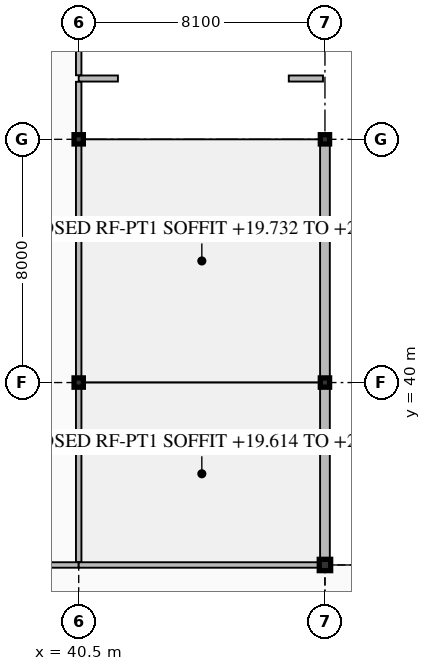
"""IFC4 building model, lengths in metres.
Left out: names, types, materials, properties, quantities, classifications, styles, units other than length and angle.
Written with IfcOpenShell. Run it as: python <this file> out.ifc"""

import sys

from ifc_helpers import new_model, si_unit, direction, frame, frame_2d, origin, origin_2d, place, context, subcontext, project, spatial, rectangle, hollow_rectangle, i_section, extrude, element, fill, save


model = new_model("IFC4")
c1 = context("Model", 3, precision=1e-05, world=origin(), true_north=direction((0.0, 1.0)))
c2 = subcontext(c1, "Body", "Model", "MODEL_VIEW")
j1 = project(units=[si_unit("LENGTHUNIT", "METRE"), si_unit("PLANEANGLEUNIT", "RADIAN")], contexts=[c1])
p1 = place(None, origin())
s1 = spatial("IfcSite", under=j1, at=p1, CompositionType="ELEMENT")
p2 = place(p1, origin())
s2 = spatial("IfcBuilding", under=s1, at=p2, CompositionType="ELEMENT")
p3 = place(p2, frame((0.0, 0.0, 14.7)))
s3 = spatial("IfcBuildingStorey", under=s2, at=p3, CompositionType="ELEMENT", Elevation=14.7)
for number, where, z_axis, x_axis in (
    (1, (40.5, 40.0, 0.0), (0.0, 0.0, 1.0), (1.0, 0.0, 0.0)),
    (2, (40.5, 48.0, 0.0), (0.0, 0.0, 1.0), (1.0, 0.0, 0.0)),
):
    element("IfcColumn", number, at=place(p3, frame(where, z_axis=z_axis, x_axis=x_axis)), inside=s3, PredefinedType="COLUMN", context=c2, shape_type="SweptSolid", body=[
        extrude(hollow_rectangle(XDim=0.305, YDim=0.305, WallThickness=0.016, InnerFilletRadius=0.016, OuterFilletRadius=0.032, at=origin_2d()), origin(), (0.0, 0.0, 1.0), 5.1),
    ])
p4 = place(p3, frame((48.6, 34.0, 0.0), z_axis=(0.0, 0.0, 1.0), x_axis=(1.0, 0.0, 0.0)))
e3 = element("IfcColumn", 3, at=p4, inside=s3, PredefinedType="COLUMN", context=c2, shape_type="SweptSolid", body=[
    extrude(i_section(OverallWidth=0.374, OverallDepth=0.372, WebThickness=0.016, FlangeThickness=0.026, FilletRadius=0.016, at=origin_2d()), origin(), (0.0, 0.0, 1.0), 5.1),
])
for number, where, z_axis, x_axis in (
    (4, (48.6, 40.0, 0.0), (0.0, 0.0, 1.0), (1.0, 0.0, 0.0)),
    (5, (48.6, 48.0, 0.0), (0.0, 0.0, 1.0), (1.0, 0.0, 0.0)),
):
    element("IfcColumn", number, at=place(p3, frame(where, z_axis=z_axis, x_axis=x_axis)), inside=s3, PredefinedType="COLUMN", context=c2, shape_type="SweptSolid", body=[
        extrude(hollow_rectangle(XDim=0.305, YDim=0.305, WallThickness=0.016, InnerFilletRadius=0.016, OuterFilletRadius=0.032, at=origin_2d()), origin(), (0.0, 0.0, 1.0), 4.84),
    ])
p5 = place(p3, frame((48.6, 34.18, 0.0), z_axis=(0.0, 0.0, 1.0), x_axis=(0.0, 1.0, 0.0)))
e6 = element("IfcWall", 6, at=p5, inside=s3, PredefinedType="SOLIDWALL", context=c2, shape_type="SweptSolid", body=[
    extrude(rectangle(XDim=13.64, YDim=0.32, at=frame_2d((6.82, 0.0))), origin(), (0.0, 0.0, 1.0), 4.84),
])
p6 = place(p5, frame((8.55, 0.0, 0.85)))
e7 = element("IfcOpeningElement", 7, at=p6, cuts=e6, PredefinedType="OPENING", context=c2, shape_type="SweptSolid", body=[
    extrude(rectangle(XDim=0.9, YDim=2.4, at=frame_2d((0.45, 1.2))), frame((0.0, 0.17, 0.0), z_axis=(0.0, -1.0, 0.0), x_axis=(1.0, 0.0, 0.0)), (0.0, 0.0, 1.0), 0.34),
])
p7 = place(p3, frame((36.2, 34.0, 0.0), z_axis=(0.0, 0.0, 1.0), x_axis=(1.0, 0.0, 0.0)))
e8 = element("IfcWall", 8, at=p7, inside=s3, PredefinedType="PARTITIONING", context=c2, shape_type="SweptSolid", body=[
    extrude(rectangle(XDim=4.3, YDim=0.18, at=frame_2d((2.15, 0.0))), origin(), (0.0, 0.0, 1.0), 4.144),
])
p8 = place(p7, frame((1.55, 0.0, 0.0)))
e9 = element("IfcOpeningElement", 9, at=p8, cuts=e8, PredefinedType="OPENING", context=c2, shape_type="SweptSolid", body=[
    extrude(rectangle(XDim=1.2, YDim=2.2, at=frame_2d((0.6, 1.1))), frame((0.0, 0.1, 0.0), z_axis=(0.0, -1.0, 0.0), x_axis=(1.0, 0.0, 0.0)), (0.0, 0.0, 1.0), 0.2),
])
p9 = place(p3, frame((40.5, 34.0, 0.0), z_axis=(0.0, 0.0, 1.0), x_axis=(1.0, 0.0, 0.0)))
e10 = element("IfcWall", 10, at=p9, inside=s3, PredefinedType="PARTITIONING", context=c2, shape_type="SweptSolid", body=[
    extrude(rectangle(XDim=7.905, YDim=0.18, at=frame_2d((3.953, 0.0))), origin(), (0.0, 0.0, 1.0), 4.144),
])
p10 = place(p3, frame((40.5, 50.0, 0.0), z_axis=(0.0, 0.0, 1.0), x_axis=(1.0, 0.0, 0.0)))
e11 = element("IfcWall", 11, at=p10, inside=s3, PredefinedType="PARTITIONING", context=c2, shape_type="SweptSolid", body=[
    extrude(rectangle(XDim=1.29, YDim=0.2, at=frame_2d((0.645, 0.0))), origin(), (0.0, 0.0, 1.0), 4.84),
])
p11 = place(p3, frame((47.41, 50.0, 0.0), z_axis=(0.0, 0.0, 1.0), x_axis=(1.0, 0.0, 0.0)))
e12 = element("IfcWall", 12, at=p11, inside=s3, PredefinedType="PARTITIONING", context=c2, shape_type="SweptSolid", body=[
    extrude(rectangle(XDim=1.125, YDim=0.2, at=frame_2d((0.562, 0.0))), origin(), (0.0, 0.0, 1.0), 4.84),
])
p12 = place(p3, frame((40.5, 34.098, 0.0), z_axis=(0.0, 0.0, 1.0), x_axis=(0.0, 1.0, 0.0)))
e13 = element("IfcWall", 13, at=p12, inside=s3, PredefinedType="PARTITIONING", context=c2, shape_type="SweptSolid", body=[
    extrude(rectangle(XDim=5.742, YDim=0.18, at=frame_2d((2.871, 0.0))), origin(), (0.0, 0.0, 1.0), 4.84),
])
p13 = place(p3, frame((40.5, 40.16, 0.0), z_axis=(0.0, 0.0, 1.0), x_axis=(0.0, 1.0, 0.0)))
e14 = element("IfcWall", 14, at=p13, inside=s3, PredefinedType="PARTITIONING", context=c2, shape_type="SweptSolid", body=[
    extrude(rectangle(XDim=7.679, YDim=0.18, at=frame_2d((3.84, 0.0))), origin(), (0.0, 0.0, 1.0), 4.369),
])
p14 = place(p13, frame((3.29, 0.0, 0.0)))
e15 = element("IfcOpeningElement", 15, at=p14, cuts=e14, PredefinedType="OPENING", context=c2, shape_type="SweptSolid", body=[
    extrude(rectangle(XDim=1.1, YDim=2.2, at=frame_2d((0.55, 1.1))), frame((0.0, 0.1, 0.0), z_axis=(0.0, -1.0, 0.0), x_axis=(1.0, 0.0, 0.0)), (0.0, 0.0, 1.0), 0.2),
])
p15 = place(p3, frame((40.5, 48.16, 0.0), z_axis=(0.0, 0.0, 1.0), x_axis=(0.0, 1.0, 0.0)))
e16 = element("IfcWall", 16, at=p15, inside=s3, PredefinedType="PARTITIONING", context=c2, shape_type="SweptSolid", body=[
    extrude(rectangle(XDim=1.732, YDim=0.18, at=frame_2d((0.866, 0.0))), origin(), (0.0, 0.0, 1.0), 4.332),
])
p16 = place(p3, frame((40.5, 50.108, 0.0), z_axis=(0.0, 0.0, 1.0), x_axis=(0.0, 1.0, 0.0)))
e17 = element("IfcWall", 17, at=p16, inside=s3, PredefinedType="PARTITIONING", context=c2, shape_type="SweptSolid", body=[
    extrude(rectangle(XDim=5.732, YDim=0.18, at=frame_2d((2.866, 0.0))), origin(), (0.0, 0.0, 1.0), 4.332),
])
p17 = place(p6, origin())
e18 = element("IfcWindow", 18, at=p17, inside=s3, PartitioningType="DOUBLE_PANEL_HORIZONTAL", PredefinedType="WINDOW", context=c2, shape_type="SweptSolid", body=[
    extrude(rectangle(XDim=0.9, YDim=2.4, at=frame_2d((0.45, 1.2))), frame((0.0, 0.03, 0.0), z_axis=(0.0, -1.0, 0.0), x_axis=(1.0, 0.0, 0.0)), (0.0, 0.0, 1.0), 0.06),
])
fill(e7, e18)
p18 = place(p14, frame((1.1, 0.0, 0.0), z_axis=(0.0, 0.0, 1.0), x_axis=(-1.0, 0.0, 0.0)))
e19 = element("IfcDoor", 19, at=p18, inside=s3, OperationType="SINGLE_SWING_RIGHT", PredefinedType="DOOR", context=c2, shape_type="SweptSolid", body=[
    extrude(rectangle(XDim=1.1, YDim=2.2, at=frame_2d((0.55, 1.1))), frame((0.0, 0.025, 0.0), z_axis=(0.0, -1.0, 0.0), x_axis=(1.0, 0.0, 0.0)), (0.0, 0.0, 1.0), 0.05),
])
fill(e15, e19)
save(model, sys.argv[1])
